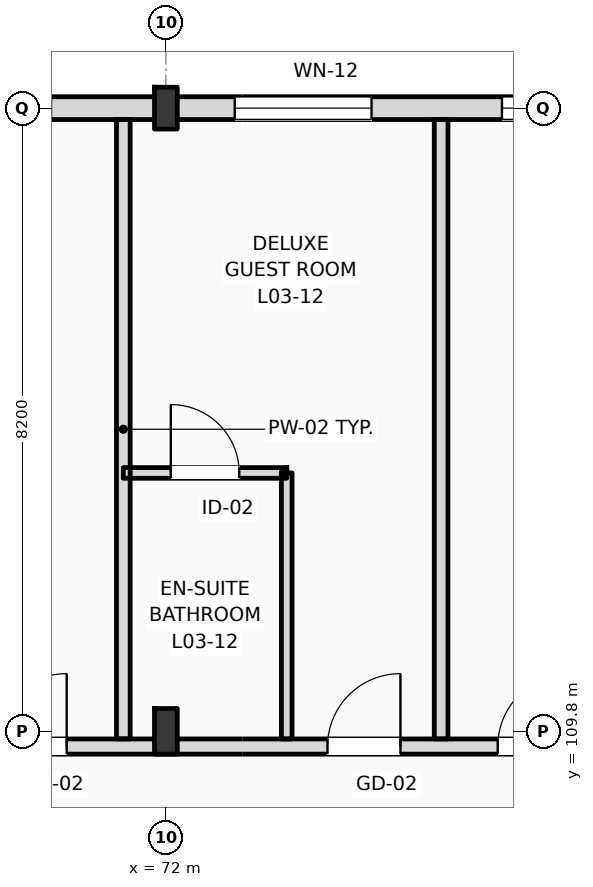
"""IFC4 building model, lengths in metres.
Left out: names, types, materials, properties, quantities, classifications, styles, units other than length and angle.
Written with IfcOpenShell. Run it as: python <this file> out.ifc"""

import sys

from ifc_helpers import new_model, si_unit, direction, frame, frame_2d, origin, origin_2d, place, context, subcontext, project, spatial, rectangle, i_section, extrude, element, fill, save


model = new_model("IFC4")
c1 = context("Model", 3, precision=1e-05, world=origin(), true_north=direction((0.0, 1.0)))
c2 = subcontext(c1, "Body", "Model", "MODEL_VIEW")
j1 = project(units=[si_unit("LENGTHUNIT", "METRE"), si_unit("PLANEANGLEUNIT", "RADIAN")], contexts=[c1])
p1 = place(None, origin())
s1 = spatial("IfcSite", under=j1, at=p1, CompositionType="ELEMENT")
p2 = place(p1, origin())
s2 = spatial("IfcBuilding", under=s1, at=p2, CompositionType="ELEMENT")
p3 = place(p2, frame((0.0, 0.0, 16.2)))
s3 = spatial("IfcBuildingStorey", under=s2, at=p3, CompositionType="ELEMENT", Elevation=16.2)
p4 = place(p3, frame((72.0, 109.8, 0.0), z_axis=(0.0, 0.0, 1.0), x_axis=(1.0, 0.0, 0.0)))
e1 = element("IfcColumn", 1, at=p4, inside=s3, PredefinedType="COLUMN", context=c2, shape_type="SweptSolid", body=[
    extrude(i_section(OverallWidth=0.3, OverallDepth=0.6, WebThickness=0.015, FlangeThickness=0.03, FilletRadius=0.027, at=origin_2d()), origin(), (0.0, 0.0, 1.0), 4.2),
])
p5 = place(p3, frame((72.0, 118.0, 0.0), z_axis=(0.0, 0.0, 1.0), x_axis=(1.0, 0.0, 0.0)))
e2 = element("IfcColumn", 2, at=p5, inside=s3, PredefinedType="COLUMN", context=c2, shape_type="SweptSolid", body=[
    extrude(i_section(OverallWidth=0.3, OverallDepth=0.55, WebThickness=0.015, FlangeThickness=0.029, FilletRadius=0.027, at=origin_2d()), origin(), (0.0, 0.0, 1.0), 4.2),
])
p6 = place(p3, frame((22.5, 118.0, 0.0), z_axis=(0.0, 0.0, 1.0), x_axis=(1.0, 0.0, 0.0)))
e3 = element("IfcWall", 3, at=p6, inside=s3, PredefinedType="STANDARD", context=c2, shape_type="SweptSolid", body=[
    extrude(rectangle(XDim=97.5, YDim=0.3, at=frame_2d((48.75, 0.0))), origin(), (0.0, 0.0, 1.0), 3.36),
])
p7 = place(p6, frame((3.721, 0.0, 0.9)))
e4 = element("IfcOpeningElement", 4, at=p7, cuts=e3, PredefinedType="OPENING", context=c2, shape_type="SweptSolid", body=[
    extrude(rectangle(XDim=0.9, YDim=1.8, at=frame_2d((0.45, 0.9))), frame((0.0, 0.16, 0.0), z_axis=(0.0, -1.0, 0.0), x_axis=(1.0, 0.0, 0.0)), (0.0, 0.0, 1.0), 0.32),
])
p8 = place(p6, frame((6.447, 0.0, 0.9)))
e5 = element("IfcOpeningElement", 5, at=p8, cuts=e3, PredefinedType="OPENING", context=c2, shape_type="SweptSolid", body=[
    extrude(rectangle(XDim=1.35, YDim=1.85, at=frame_2d((0.675, 0.925))), frame((0.0, 0.16, 0.0), z_axis=(0.0, -1.0, 0.0), x_axis=(1.0, 0.0, 0.0)), (0.0, 0.0, 1.0), 0.32),
])
p9 = place(p6, frame((11.363, 0.0, 0.9)))
e6 = element("IfcOpeningElement", 6, at=p9, cuts=e3, PredefinedType="OPENING", context=c2, shape_type="SweptSolid", body=[
    extrude(rectangle(XDim=1.5, YDim=1.9, at=frame_2d((0.75, 0.95))), frame((0.0, 0.16, 0.0), z_axis=(0.0, -1.0, 0.0), x_axis=(1.0, 0.0, 0.0)), (0.0, 0.0, 1.0), 0.32),
])
p10 = place(p6, frame((15.078, 0.0, 0.9)))
e7 = element("IfcOpeningElement", 7, at=p10, cuts=e3, PredefinedType="OPENING", context=c2, shape_type="SweptSolid", body=[
    extrude(rectangle(XDim=1.65, YDim=1.95, at=frame_2d((0.825, 0.975))), frame((0.0, 0.16, 0.0), z_axis=(0.0, -1.0, 0.0), x_axis=(1.0, 0.0, 0.0)), (0.0, 0.0, 1.0), 0.32),
])
p11 = place(p6, frame((19.395, 0.0, 0.9)))
e8 = element("IfcOpeningElement", 8, at=p11, cuts=e3, PredefinedType="OPENING", context=c2, shape_type="SweptSolid", body=[
    extrude(rectangle(XDim=1.8, YDim=2.0, at=frame_2d((0.9, 1.0))), frame((0.0, 0.16, 0.0), z_axis=(0.0, -1.0, 0.0), x_axis=(1.0, 0.0, 0.0)), (0.0, 0.0, 1.0), 0.32),
])
p12 = place(p6, frame((23.31, 0.0, 0.9)))
e9 = element("IfcOpeningElement", 9, at=p12, cuts=e3, PredefinedType="OPENING", context=c2, shape_type="SweptSolid", body=[
    extrude(rectangle(XDim=1.95, YDim=2.05, at=frame_2d((0.975, 1.025))), frame((0.0, 0.16, 0.0), z_axis=(0.0, -1.0, 0.0), x_axis=(1.0, 0.0, 0.0)), (0.0, 0.0, 1.0), 0.32),
])
p13 = place(p6, frame((28.026, 0.0, 0.9)))
e10 = element("IfcOpeningElement", 10, at=p13, cuts=e3, PredefinedType="OPENING", context=c2, shape_type="SweptSolid", body=[
    extrude(rectangle(XDim=2.1, YDim=2.1, at=frame_2d((1.05, 1.05))), frame((0.0, 0.16, 0.0), z_axis=(0.0, -1.0, 0.0), x_axis=(1.0, 0.0, 0.0)), (0.0, 0.0, 1.0), 0.32),
])
p14 = place(p6, frame((31.941, 0.0, 0.9)))
e11 = element("IfcOpeningElement", 11, at=p14, cuts=e3, PredefinedType="OPENING", context=c2, shape_type="SweptSolid", body=[
    extrude(rectangle(XDim=1.1, YDim=2.15, at=frame_2d((0.55, 1.075))), frame((0.0, 0.16, 0.0), z_axis=(0.0, -1.0, 0.0), x_axis=(1.0, 0.0, 0.0)), (0.0, 0.0, 1.0), 0.32),
])
p15 = place(p6, frame((36.657, 0.0, 0.9)))
e12 = element("IfcOpeningElement", 12, at=p15, cuts=e3, PredefinedType="OPENING", context=c2, shape_type="SweptSolid", body=[
    extrude(rectangle(XDim=2.4, YDim=2.2, at=frame_2d((1.2, 1.1))), frame((0.0, 0.16, 0.0), z_axis=(0.0, -1.0, 0.0), x_axis=(1.0, 0.0, 0.0)), (0.0, 0.0, 1.0), 0.32),
])
p16 = place(p6, frame((42.574, 0.0, 0.9)))
e13 = element("IfcOpeningElement", 13, at=p16, cuts=e3, PredefinedType="OPENING", context=c2, shape_type="SweptSolid", body=[
    extrude(rectangle(XDim=1.35, YDim=2.25, at=frame_2d((0.675, 1.125))), frame((0.0, 0.16, 0.0), z_axis=(0.0, -1.0, 0.0), x_axis=(1.0, 0.0, 0.0)), (0.0, 0.0, 1.0), 0.32),
])
p17 = place(p6, frame((45.289, 0.0, 0.9)))
e14 = element("IfcOpeningElement", 14, at=p17, cuts=e3, PredefinedType="OPENING", context=c2, shape_type="SweptSolid", body=[
    extrude(rectangle(XDim=2.7, YDim=2.28, at=frame_2d((1.35, 1.14))), frame((0.0, 0.16, 0.0), z_axis=(0.0, -1.0, 0.0), x_axis=(1.0, 0.0, 0.0)), (0.0, 0.0, 1.0), 0.32),
])
p18 = place(p6, frame((50.406, 0.0, 0.9)))
e15 = element("IfcOpeningElement", 15, at=p18, cuts=e3, PredefinedType="OPENING", context=c2, shape_type="SweptSolid", body=[
    extrude(rectangle(XDim=1.8, YDim=2.28, at=frame_2d((0.9, 1.14))), frame((0.0, 0.16, 0.0), z_axis=(0.0, -1.0, 0.0), x_axis=(1.0, 0.0, 0.0)), (0.0, 0.0, 1.0), 0.32),
])
p19 = place(p6, frame((53.922, 0.0, 0.9)))
e16 = element("IfcOpeningElement", 16, at=p19, cuts=e3, PredefinedType="OPENING", context=c2, shape_type="SweptSolid", body=[
    extrude(rectangle(XDim=1.8, YDim=2.28, at=frame_2d((0.9, 1.14))), frame((0.0, 0.16, 0.0), z_axis=(0.0, -1.0, 0.0), x_axis=(1.0, 0.0, 0.0)), (0.0, 0.0, 1.0), 0.32),
])
p20 = place(p6, frame((58.332, 0.0, 0.9)))
e17 = element("IfcOpeningElement", 17, at=p20, cuts=e3, PredefinedType="OPENING", context=c2, shape_type="SweptSolid", body=[
    extrude(rectangle(XDim=2.961, YDim=2.28, at=frame_2d((1.48, 1.14))), frame((0.0, 0.16, 0.0), z_axis=(0.0, -1.0, 0.0), x_axis=(1.0, 0.0, 0.0)), (0.0, 0.0, 1.0), 0.32),
])
p21 = place(p6, frame((62.513, 0.0, 0.9)))
e18 = element("IfcOpeningElement", 18, at=p21, cuts=e3, PredefinedType="OPENING", context=c2, shape_type="SweptSolid", body=[
    extrude(rectangle(XDim=1.8, YDim=2.28, at=frame_2d((0.9, 1.14))), frame((0.0, 0.16, 0.0), z_axis=(0.0, -1.0, 0.0), x_axis=(1.0, 0.0, 0.0)), (0.0, 0.0, 1.0), 0.32),
])
p22 = place(p6, frame((67.114, 0.0, 0.9)))
e19 = element("IfcOpeningElement", 19, at=p22, cuts=e3, PredefinedType="OPENING", context=c2, shape_type="SweptSolid", body=[
    extrude(rectangle(XDim=2.961, YDim=2.28, at=frame_2d((1.48, 1.14))), frame((0.0, 0.16, 0.0), z_axis=(0.0, -1.0, 0.0), x_axis=(1.0, 0.0, 0.0)), (0.0, 0.0, 1.0), 0.32),
])
p23 = place(p6, frame((73.695, 0.0, 0.9)))
e20 = element("IfcOpeningElement", 20, at=p23, cuts=e3, PredefinedType="OPENING", context=c2, shape_type="SweptSolid", body=[
    extrude(rectangle(XDim=1.1, YDim=2.28, at=frame_2d((0.55, 1.14))), frame((0.0, 0.16, 0.0), z_axis=(0.0, -1.0, 0.0), x_axis=(1.0, 0.0, 0.0)), (0.0, 0.0, 1.0), 0.32),
])
p24 = place(p6, frame((75.895, 0.0, 0.9)))
e21 = element("IfcOpeningElement", 21, at=p24, cuts=e3, PredefinedType="OPENING", context=c2, shape_type="SweptSolid", body=[
    extrude(rectangle(XDim=2.961, YDim=2.28, at=frame_2d((1.48, 1.14))), frame((0.0, 0.16, 0.0), z_axis=(0.0, -1.0, 0.0), x_axis=(1.0, 0.0, 0.0)), (0.0, 0.0, 1.0), 0.32),
])
p25 = place(p6, frame((81.676, 0.0, 0.9)))
e22 = element("IfcOpeningElement", 22, at=p25, cuts=e3, PredefinedType="OPENING", context=c2, shape_type="SweptSolid", body=[
    extrude(rectangle(XDim=1.8, YDim=2.28, at=frame_2d((0.9, 1.14))), frame((0.0, 0.16, 0.0), z_axis=(0.0, -1.0, 0.0), x_axis=(1.0, 0.0, 0.0)), (0.0, 0.0, 1.0), 0.32),
])
p26 = place(p6, frame((84.677, 0.0, 0.9)))
e23 = element("IfcOpeningElement", 23, at=p26, cuts=e3, PredefinedType="OPENING", context=c2, shape_type="SweptSolid", body=[
    extrude(rectangle(XDim=2.961, YDim=2.28, at=frame_2d((1.48, 1.14))), frame((0.0, 0.16, 0.0), z_axis=(0.0, -1.0, 0.0), x_axis=(1.0, 0.0, 0.0)), (0.0, 0.0, 1.0), 0.32),
])
p27 = place(p6, frame((89.999, 0.0, 0.9)))
e24 = element("IfcOpeningElement", 24, at=p27, cuts=e3, PredefinedType="OPENING", context=c2, shape_type="SweptSolid", body=[
    extrude(rectangle(XDim=1.1, YDim=1.5, at=frame_2d((0.55, 0.75))), frame((0.0, 0.16, 0.0), z_axis=(0.0, -1.0, 0.0), x_axis=(1.0, 0.0, 0.0)), (0.0, 0.0, 1.0), 0.32),
])
p28 = place(p6, frame((94.35, 0.0, 0.9)))
e25 = element("IfcOpeningElement", 25, at=p28, cuts=e3, PredefinedType="OPENING", context=c2, shape_type="SweptSolid", body=[
    extrude(rectangle(XDim=1.25, YDim=1.6, at=frame_2d((0.625, 0.8))), frame((0.0, 0.16, 0.0), z_axis=(0.0, -1.0, 0.0), x_axis=(1.0, 0.0, 0.0)), (0.0, 0.0, 1.0), 0.32),
])
p29 = place(p3, frame((10.65, 109.6, 0.0), z_axis=(0.0, 0.0, 1.0), x_axis=(1.0, 0.0, 0.0)))
e26 = element("IfcWall", 26, at=p29, inside=s3, PredefinedType="PARTITIONING", context=c2, shape_type="SweptSolid", body=[
    extrude(rectangle(XDim=109.21, YDim=0.2, at=frame_2d((54.605, 0.0))), origin(), (0.0, 0.0, 1.0), 3.36),
])
p30 = place(p29, frame((15.43, 0.0, 0.0)))
e27 = element("IfcOpeningElement", 27, at=p30, cuts=e26, PredefinedType="OPENING", context=c2, shape_type="SweptSolid", body=[
    extrude(rectangle(XDim=1.02, YDim=2.2, at=frame_2d((0.51, 1.1))), frame((0.0, 0.11, 0.0), z_axis=(0.0, -1.0, 0.0), x_axis=(1.0, 0.0, 0.0)), (0.0, 0.0, 1.0), 0.22),
])
p31 = place(p29, frame((19.537, 0.0, 0.0)))
e28 = element("IfcOpeningElement", 28, at=p31, cuts=e26, PredefinedType="OPENING", context=c2, shape_type="SweptSolid", body=[
    extrude(rectangle(XDim=1.02, YDim=2.2, at=frame_2d((0.51, 1.1))), frame((0.0, 0.11, 0.0), z_axis=(0.0, -1.0, 0.0), x_axis=(1.0, 0.0, 0.0)), (0.0, 0.0, 1.0), 0.22),
])
p32 = place(p29, frame((23.928, 0.0, 0.0)))
e29 = element("IfcOpeningElement", 29, at=p32, cuts=e26, PredefinedType="OPENING", context=c2, shape_type="SweptSolid", body=[
    extrude(rectangle(XDim=1.02, YDim=2.2, at=frame_2d((0.51, 1.1))), frame((0.0, 0.11, 0.0), z_axis=(0.0, -1.0, 0.0), x_axis=(1.0, 0.0, 0.0)), (0.0, 0.0, 1.0), 0.22),
])
p33 = place(p29, frame((26.169, 0.0, 0.0)))
e30 = element("IfcOpeningElement", 30, at=p33, cuts=e26, PredefinedType="OPENING", context=c2, shape_type="SweptSolid", body=[
    extrude(rectangle(XDim=1.02, YDim=2.2, at=frame_2d((0.51, 1.1))), frame((0.0, 0.11, 0.0), z_axis=(0.0, -1.0, 0.0), x_axis=(1.0, 0.0, 0.0)), (0.0, 0.0, 1.0), 0.22),
])
p34 = place(p29, frame((32.739, 0.0, 0.0)))
e31 = element("IfcOpeningElement", 31, at=p34, cuts=e26, PredefinedType="OPENING", context=c2, shape_type="SweptSolid", body=[
    extrude(rectangle(XDim=0.96, YDim=2.2, at=frame_2d((0.48, 1.1))), frame((0.0, 0.11, 0.0), z_axis=(0.0, -1.0, 0.0), x_axis=(1.0, 0.0, 0.0)), (0.0, 0.0, 1.0), 0.22),
])
p35 = place(p29, frame((34.98, 0.0, 0.0)))
e32 = element("IfcOpeningElement", 32, at=p35, cuts=e26, PredefinedType="OPENING", context=c2, shape_type="SweptSolid", body=[
    extrude(rectangle(XDim=0.96, YDim=2.2, at=frame_2d((0.48, 1.1))), frame((0.0, 0.11, 0.0), z_axis=(0.0, -1.0, 0.0), x_axis=(1.0, 0.0, 0.0)), (0.0, 0.0, 1.0), 0.22),
])
p36 = place(p29, frame((41.521, 0.0, 0.0)))
e33 = element("IfcOpeningElement", 33, at=p36, cuts=e26, PredefinedType="OPENING", context=c2, shape_type="SweptSolid", body=[
    extrude(rectangle(XDim=0.96, YDim=2.2, at=frame_2d((0.48, 1.1))), frame((0.0, 0.11, 0.0), z_axis=(0.0, -1.0, 0.0), x_axis=(1.0, 0.0, 0.0)), (0.0, 0.0, 1.0), 0.22),
])
p37 = place(p29, frame((43.512, 0.0, 0.0)))
e34 = element("IfcOpeningElement", 34, at=p37, cuts=e26, PredefinedType="OPENING", context=c2, shape_type="SweptSolid", body=[
    extrude(rectangle(XDim=0.96, YDim=2.2, at=frame_2d((0.48, 1.1))), frame((0.0, 0.11, 0.0), z_axis=(0.0, -1.0, 0.0), x_axis=(1.0, 0.0, 0.0)), (0.0, 0.0, 1.0), 0.22),
])
p38 = place(p29, frame((50.303, 0.0, 0.0)))
e35 = element("IfcOpeningElement", 35, at=p38, cuts=e26, PredefinedType="OPENING", context=c2, shape_type="SweptSolid", body=[
    extrude(rectangle(XDim=0.96, YDim=2.2, at=frame_2d((0.48, 1.1))), frame((0.0, 0.11, 0.0), z_axis=(0.0, -1.0, 0.0), x_axis=(1.0, 0.0, 0.0)), (0.0, 0.0, 1.0), 0.22),
])
p39 = place(p29, frame((54.944, 0.0, 0.0)))
e36 = element("IfcOpeningElement", 36, at=p39, cuts=e26, PredefinedType="OPENING", context=c2, shape_type="SweptSolid", body=[
    extrude(rectangle(XDim=0.96, YDim=2.2, at=frame_2d((0.48, 1.1))), frame((0.0, 0.11, 0.0), z_axis=(0.0, -1.0, 0.0), x_axis=(1.0, 0.0, 0.0)), (0.0, 0.0, 1.0), 0.22),
])
p40 = place(p29, frame((59.085, 0.0, 0.0)))
e37 = element("IfcOpeningElement", 37, at=p40, cuts=e26, PredefinedType="OPENING", context=c2, shape_type="SweptSolid", body=[
    extrude(rectangle(XDim=0.96, YDim=2.2, at=frame_2d((0.48, 1.1))), frame((0.0, 0.11, 0.0), z_axis=(0.0, -1.0, 0.0), x_axis=(1.0, 0.0, 0.0)), (0.0, 0.0, 1.0), 0.22),
])
p41 = place(p29, frame((63.476, 0.0, 0.0)))
e38 = element("IfcOpeningElement", 38, at=p41, cuts=e26, PredefinedType="OPENING", context=c2, shape_type="SweptSolid", body=[
    extrude(rectangle(XDim=0.96, YDim=2.2, at=frame_2d((0.48, 1.1))), frame((0.0, 0.11, 0.0), z_axis=(0.0, -1.0, 0.0), x_axis=(1.0, 0.0, 0.0)), (0.0, 0.0, 1.0), 0.22),
])
p42 = place(p29, frame((65.716, 0.0, 0.0)))
e39 = element("IfcOpeningElement", 39, at=p42, cuts=e26, PredefinedType="OPENING", context=c2, shape_type="SweptSolid", body=[
    extrude(rectangle(XDim=0.96, YDim=2.2, at=frame_2d((0.48, 1.1))), frame((0.0, 0.11, 0.0), z_axis=(0.0, -1.0, 0.0), x_axis=(1.0, 0.0, 0.0)), (0.0, 0.0, 1.0), 0.22),
])
p43 = place(p29, frame((72.257, 0.0, 0.0)))
e40 = element("IfcOpeningElement", 40, at=p43, cuts=e26, PredefinedType="OPENING", context=c2, shape_type="SweptSolid", body=[
    extrude(rectangle(XDim=0.96, YDim=2.2, at=frame_2d((0.48, 1.1))), frame((0.0, 0.11, 0.0), z_axis=(0.0, -1.0, 0.0), x_axis=(1.0, 0.0, 0.0)), (0.0, 0.0, 1.0), 0.22),
])
p44 = place(p29, frame((74.498, 0.0, 0.0)))
e41 = element("IfcOpeningElement", 41, at=p44, cuts=e26, PredefinedType="OPENING", context=c2, shape_type="SweptSolid", body=[
    extrude(rectangle(XDim=0.96, YDim=2.2, at=frame_2d((0.48, 1.1))), frame((0.0, 0.11, 0.0), z_axis=(0.0, -1.0, 0.0), x_axis=(1.0, 0.0, 0.0)), (0.0, 0.0, 1.0), 0.22),
])
p45 = place(p29, frame((81.039, 0.0, 0.0)))
e42 = element("IfcOpeningElement", 42, at=p45, cuts=e26, PredefinedType="OPENING", context=c2, shape_type="SweptSolid", body=[
    extrude(rectangle(XDim=0.96, YDim=2.2, at=frame_2d((0.48, 1.1))), frame((0.0, 0.11, 0.0), z_axis=(0.0, -1.0, 0.0), x_axis=(1.0, 0.0, 0.0)), (0.0, 0.0, 1.0), 0.22),
])
p46 = place(p29, frame((85.68, 0.0, 0.0)))
e43 = element("IfcOpeningElement", 43, at=p46, cuts=e26, PredefinedType="OPENING", context=c2, shape_type="SweptSolid", body=[
    extrude(rectangle(XDim=0.96, YDim=2.2, at=frame_2d((0.48, 1.1))), frame((0.0, 0.11, 0.0), z_axis=(0.0, -1.0, 0.0), x_axis=(1.0, 0.0, 0.0)), (0.0, 0.0, 1.0), 0.22),
])
p47 = place(p29, frame((89.82, 0.0, 0.0)))
e44 = element("IfcOpeningElement", 44, at=p47, cuts=e26, PredefinedType="OPENING", context=c2, shape_type="SweptSolid", body=[
    extrude(rectangle(XDim=0.96, YDim=2.2, at=frame_2d((0.48, 1.1))), frame((0.0, 0.11, 0.0), z_axis=(0.0, -1.0, 0.0), x_axis=(1.0, 0.0, 0.0)), (0.0, 0.0, 1.0), 0.22),
])
p48 = place(p29, frame((94.211, 0.0, 0.0)))
e45 = element("IfcOpeningElement", 45, at=p48, cuts=e26, PredefinedType="OPENING", context=c2, shape_type="SweptSolid", body=[
    extrude(rectangle(XDim=0.96, YDim=2.2, at=frame_2d((0.48, 1.1))), frame((0.0, 0.11, 0.0), z_axis=(0.0, -1.0, 0.0), x_axis=(1.0, 0.0, 0.0)), (0.0, 0.0, 1.0), 0.22),
])
p49 = place(p29, frame((98.602, 0.0, 0.0)))
e46 = element("IfcOpeningElement", 46, at=p49, cuts=e26, PredefinedType="OPENING", context=c2, shape_type="SweptSolid", body=[
    extrude(rectangle(XDim=0.96, YDim=2.2, at=frame_2d((0.48, 1.1))), frame((0.0, 0.11, 0.0), z_axis=(0.0, -1.0, 0.0), x_axis=(1.0, 0.0, 0.0)), (0.0, 0.0, 1.0), 0.22),
])
p50 = place(p29, frame((102.993, 0.0, 0.0)))
e47 = element("IfcOpeningElement", 47, at=p50, cuts=e26, PredefinedType="OPENING", context=c2, shape_type="SweptSolid", body=[
    extrude(rectangle(XDim=0.96, YDim=2.2, at=frame_2d((0.48, 1.1))), frame((0.0, 0.11, 0.0), z_axis=(0.0, -1.0, 0.0), x_axis=(1.0, 0.0, 0.0)), (0.0, 0.0, 1.0), 0.22),
])
p51 = place(p29, frame((105.269, 0.0, 0.0)))
e48 = element("IfcOpeningElement", 48, at=p51, cuts=e26, PredefinedType="OPENING", context=c2, shape_type="SweptSolid", body=[
    extrude(rectangle(XDim=0.96, YDim=2.2, at=frame_2d((0.48, 1.1))), frame((0.0, 0.11, 0.0), z_axis=(0.0, -1.0, 0.0), x_axis=(1.0, 0.0, 0.0)), (0.0, 0.0, 1.0), 0.22),
])
p52 = place(p29, frame((2.716, 0.0, 0.0)))
e49 = element("IfcOpeningElement", 49, at=p52, cuts=e26, PredefinedType="OPENING", context=c2, shape_type="SweptSolid", body=[
    extrude(rectangle(XDim=1.35, YDim=2.25, at=frame_2d((0.675, 1.125))), frame((0.0, 0.11, 0.0), z_axis=(0.0, -1.0, 0.0), x_axis=(1.0, 0.0, 0.0)), (0.0, 0.0, 1.0), 0.22),
])
p53 = place(p29, frame((6.65, 0.0, 0.0)))
e50 = element("IfcOpeningElement", 50, at=p53, cuts=e26, PredefinedType="OPENING", context=c2, shape_type="SweptSolid", body=[
    extrude(rectangle(XDim=1.35, YDim=2.25, at=frame_2d((0.675, 1.125))), frame((0.0, 0.11, 0.0), z_axis=(0.0, -1.0, 0.0), x_axis=(1.0, 0.0, 0.0)), (0.0, 0.0, 1.0), 0.22),
])
p54 = place(p29, frame((10.583, 0.0, 0.0)))
e51 = element("IfcOpeningElement", 51, at=p54, cuts=e26, PredefinedType="OPENING", context=c2, shape_type="SweptSolid", body=[
    extrude(rectangle(XDim=1.35, YDim=2.25, at=frame_2d((0.675, 1.125))), frame((0.0, 0.11, 0.0), z_axis=(0.0, -1.0, 0.0), x_axis=(1.0, 0.0, 0.0)), (0.0, 0.0, 1.0), 0.22),
])
for number, where, z_axis, x_axis in (
    (52, (71.44, 109.7, 0.0), (0.0, 0.0, 1.0), (0.0, 1.0, 0.0)),
    (53, (75.621, 109.7, 0.0), (0.0, 0.0, 1.0), (0.0, 1.0, 0.0)),
):
    element("IfcWall", number, at=place(p3, frame(where, z_axis=z_axis, x_axis=x_axis)), inside=s3, PredefinedType="PARTITIONING", context=c2, shape_type="SweptSolid", body=[
        extrude(rectangle(XDim=8.15, YDim=0.18, at=frame_2d((4.075, 0.0))), origin(), (0.0, 0.0, 1.0), 3.92),
    ])
p55 = place(p3, frame((73.59, 109.7, 0.0), z_axis=(0.0, 0.0, 1.0), x_axis=(0.0, 1.0, 0.0)))
e54 = element("IfcWall", 54, at=p55, inside=s3, PredefinedType="PARTITIONING", context=c2, shape_type="SweptSolid", body=[
    extrude(rectangle(XDim=3.5, YDim=0.14, at=frame_2d((1.75, 0.0))), origin(), (0.0, 0.0, 1.0), 3.92),
])
p56 = place(p3, frame((71.44, 113.2, 0.0), z_axis=(0.0, 0.0, 1.0), x_axis=(1.0, 0.0, 0.0)))
e55 = element("IfcWall", 55, at=p56, inside=s3, PredefinedType="PARTITIONING", context=c2, shape_type="SweptSolid", body=[
    extrude(rectangle(XDim=2.15, YDim=0.14, at=frame_2d((1.075, 0.0))), origin(), (0.0, 0.0, 1.0), 3.92),
])
p57 = place(p56, frame((0.625, 0.0, 0.0)))
e56 = element("IfcOpeningElement", 56, at=p57, cuts=e55, PredefinedType="OPENING", context=c2, shape_type="SweptSolid", body=[
    extrude(rectangle(XDim=0.9, YDim=2.1, at=frame_2d((0.45, 1.05))), frame((0.0, 0.08, 0.0), z_axis=(0.0, -1.0, 0.0), x_axis=(1.0, 0.0, 0.0)), (0.0, 0.0, 1.0), 0.16),
])
p58 = place(p18, origin())
e57 = element("IfcWindow", 57, at=p58, inside=s3, PartitioningType="DOUBLE_PANEL_VERTICAL", PredefinedType="WINDOW", context=c2, shape_type="SweptSolid", body=[
    extrude(rectangle(XDim=1.8, YDim=2.28, at=frame_2d((0.9, 1.14))), frame((0.0, 0.03, 0.0), z_axis=(0.0, -1.0, 0.0), x_axis=(1.0, 0.0, 0.0)), (0.0, 0.0, 1.0), 0.06),
])
fill(e15, e57)
p59 = place(p19, origin())
e58 = element("IfcWindow", 58, at=p59, inside=s3, PartitioningType="DOUBLE_PANEL_VERTICAL", PredefinedType="WINDOW", context=c2, shape_type="SweptSolid", body=[
    extrude(rectangle(XDim=1.8, YDim=2.28, at=frame_2d((0.9, 1.14))), frame((0.0, 0.03, 0.0), z_axis=(0.0, -1.0, 0.0), x_axis=(1.0, 0.0, 0.0)), (0.0, 0.0, 1.0), 0.06),
])
fill(e16, e58)
p60 = place(p40, origin())
e59 = element("IfcDoor", 59, at=p60, inside=s3, OperationType="SINGLE_SWING_RIGHT", PredefinedType="DOOR", context=c2, shape_type="SweptSolid", body=[
    extrude(rectangle(XDim=0.96, YDim=2.2, at=frame_2d((0.48, 1.1))), frame((0.0, 0.025, 0.0), z_axis=(0.0, -1.0, 0.0), x_axis=(1.0, 0.0, 0.0)), (0.0, 0.0, 1.0), 0.05),
])
fill(e37, e59)
p61 = place(p41, origin())
e60 = element("IfcDoor", 60, at=p61, inside=s3, OperationType="SINGLE_SWING_RIGHT", PredefinedType="DOOR", context=c2, shape_type="SweptSolid", body=[
    extrude(rectangle(XDim=0.96, YDim=2.2, at=frame_2d((0.48, 1.1))), frame((0.0, 0.025, 0.0), z_axis=(0.0, -1.0, 0.0), x_axis=(1.0, 0.0, 0.0)), (0.0, 0.0, 1.0), 0.05),
])
fill(e38, e60)
p62 = place(p57, origin())
e61 = element("IfcDoor", 61, at=p62, inside=s3, OperationType="SINGLE_SWING_LEFT", PredefinedType="DOOR", context=c2, shape_type="SweptSolid", body=[
    extrude(rectangle(XDim=0.9, YDim=2.1, at=frame_2d((0.45, 1.05))), frame((0.0, 0.025, 0.0), z_axis=(0.0, -1.0, 0.0), x_axis=(1.0, 0.0, 0.0)), (0.0, 0.0, 1.0), 0.05),
])
fill(e56, e61)
p63 = place(p42, origin())
e62 = element("IfcDoor", 62, at=p63, inside=s3, OperationType="SINGLE_SWING_RIGHT", PredefinedType="DOOR", context=c2, shape_type="SweptSolid", body=[
    extrude(rectangle(XDim=0.96, YDim=2.2, at=frame_2d((0.48, 1.1))), frame((0.0, 0.025, 0.0), z_axis=(0.0, -1.0, 0.0), x_axis=(1.0, 0.0, 0.0)), (0.0, 0.0, 1.0), 0.05),
])
fill(e39, e62)
save(model, sys.argv[1])
